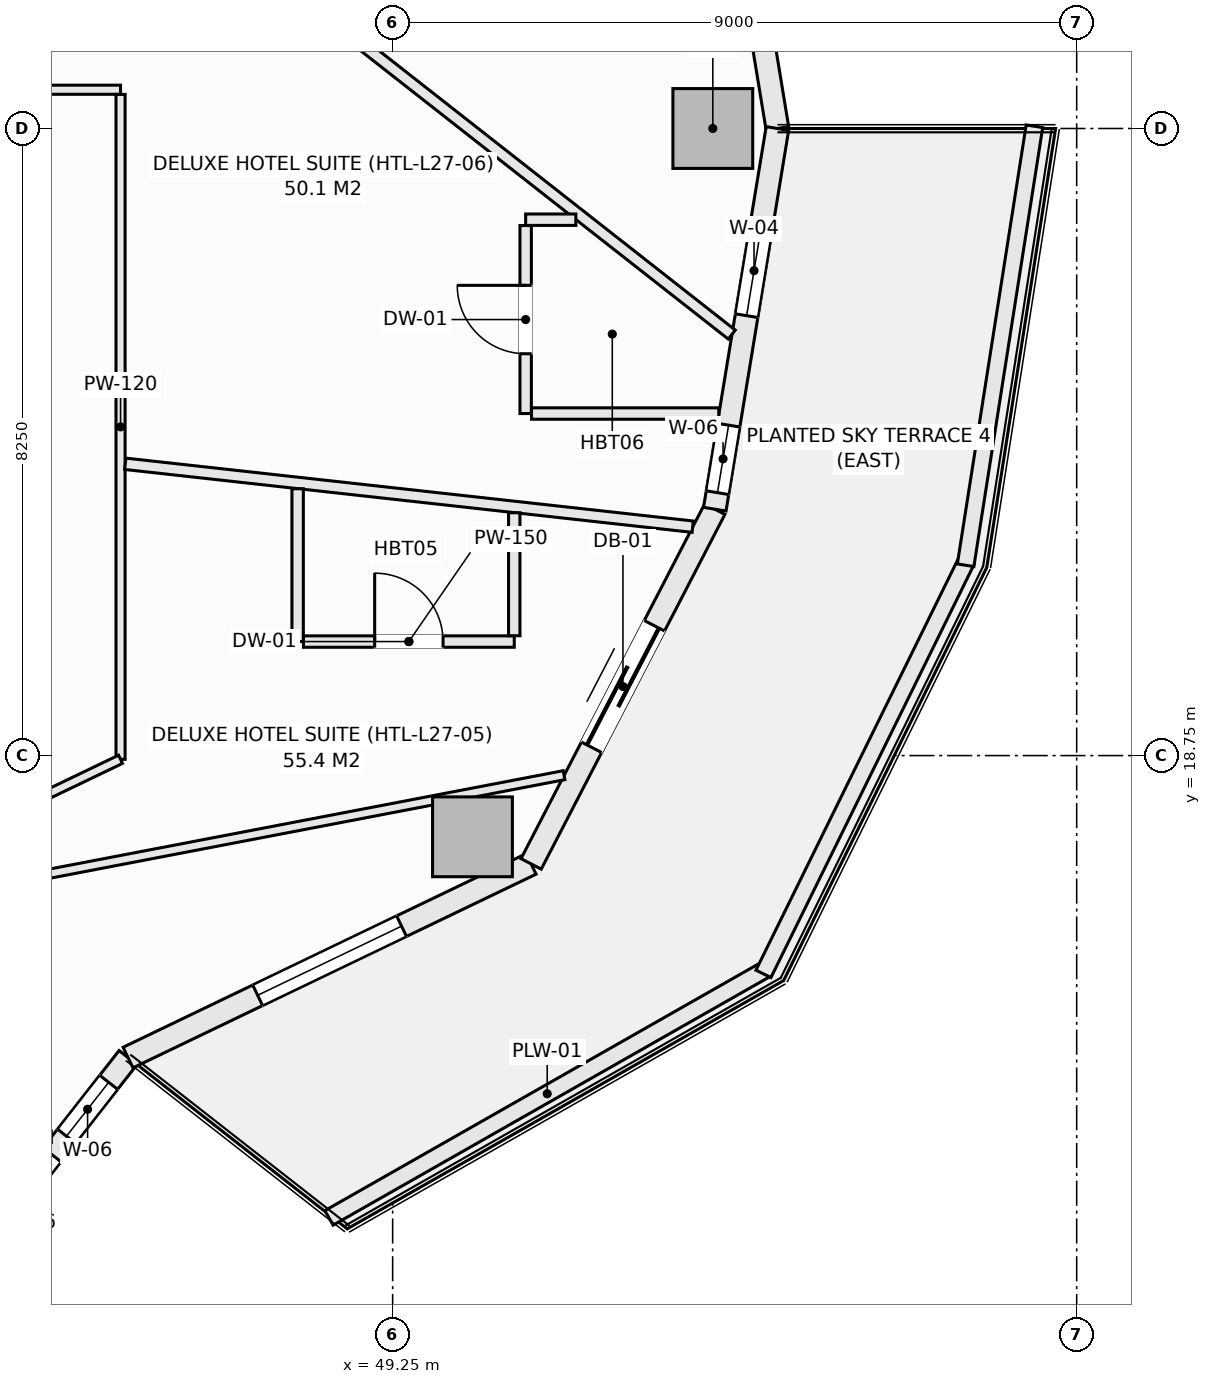
"""IFC4 building model, lengths in metres.
Left out: names, types, materials, properties, quantities, classifications, styles, units other than length and angle.
Written with IfcOpenShell. Run it as: python <this file> out.ifc"""

import sys

from ifc_helpers import new_model, si_unit, direction, frame, frame_2d, origin, origin_2d, place, context, subcontext, project, spatial, rectangle, extrude, element, fill, save


model = new_model("IFC4")
c1 = context("Model", 3, precision=1e-05, world=origin(), true_north=direction((0.0, 1.0)))
c2 = subcontext(c1, "Body", "Model", "MODEL_VIEW")
j1 = project(units=[si_unit("LENGTHUNIT", "METRE"), si_unit("PLANEANGLEUNIT", "RADIAN")], contexts=[c1])
p1 = place(None, origin())
s1 = spatial("IfcSite", under=j1, at=p1, CompositionType="ELEMENT")
p2 = place(p1, origin())
s2 = spatial("IfcBuilding", under=s1, at=p2, CompositionType="ELEMENT")
p3 = place(p2, frame((0.0, 0.0, 112.1)))
s3 = spatial("IfcBuildingStorey", under=s2, at=p3, CompositionType="ELEMENT", Elevation=112.1)
for number, where, z_axis, x_axis in (
    (1, (53.462, 27.0, -0.27), (0.0, 0.0, 1.0), (1.0, 0.0, 0.0)),
    (2, (50.3, 17.681, -0.27), (0.0, 0.0, 1.0), (1.0, 0.0, 0.0)),
):
    element("IfcColumn", number, at=place(p3, frame(where, z_axis=z_axis, x_axis=x_axis)), inside=s3, PredefinedType="COLUMN", context=c2, shape_type="SweptSolid", body=[
        extrude(rectangle(XDim=1.05, YDim=1.05, at=origin_2d()), origin(), (0.0, 0.0, 1.0), 3.4),
    ])
p4 = place(p3, frame((53.488, 32.008, 0.0), z_axis=(0.0, 0.0, 1.0), x_axis=(0.162393944769, -0.986726003864, 0.0)))
e3 = element("IfcWall", 3, at=p4, inside=s3, PredefinedType="SOLIDWALL", context=c2, shape_type="SweptSolid", body=[
    extrude(rectangle(XDim=5.075, YDim=0.3, at=frame_2d((2.538, 0.0))), origin(), (0.0, 0.0, 1.0), 2.653),
])
p5 = place(p4, frame((1.488, 0.0, 0.74)))
e4 = element("IfcOpeningElement", 4, at=p5, cuts=e3, PredefinedType="OPENING", context=c2, shape_type="SweptSolid", body=[
    extrude(rectangle(XDim=2.1, YDim=1.7, at=frame_2d((1.05, 0.85))), frame((0.0, 0.16, 0.0), z_axis=(0.0, -1.0, 0.0), x_axis=(1.0, 0.0, 0.0)), (0.0, 0.0, 1.0), 0.32),
])
p6 = place(p3, frame((42.219, 10.242, 0.0), z_axis=(0.0, 0.0, 1.0), x_axis=(0.616435134162, 0.787405693001, 0.0)))
e5 = element("IfcWall", 5, at=p6, inside=s3, PredefinedType="SOLIDWALL", context=c2, shape_type="SweptSolid", body=[
    extrude(rectangle(XDim=5.759, YDim=0.3, at=frame_2d((2.879, 0.0))), origin(), (0.0, 0.0, 1.0), 2.653),
])
p7 = place(p6, frame((3.236, 0.0, 0.74)))
e6 = element("IfcOpeningElement", 6, at=p7, cuts=e5, PredefinedType="OPENING", context=c2, shape_type="SweptSolid", body=[
    extrude(rectangle(XDim=0.9, YDim=1.7, at=frame_2d((0.45, 0.85))), frame((0.0, 0.16, 0.0), z_axis=(0.0, -1.0, 0.0), x_axis=(1.0, 0.0, 0.0)), (0.0, 0.0, 1.0), 0.32),
])
p8 = place(p6, frame((4.445, 0.0, 0.74)))
e7 = element("IfcOpeningElement", 7, at=p8, cuts=e5, PredefinedType="OPENING", context=c2, shape_type="SweptSolid", body=[
    extrude(rectangle(XDim=0.9, YDim=1.7, at=frame_2d((0.45, 0.85))), frame((0.0, 0.16, 0.0), z_axis=(0.0, -1.0, 0.0), x_axis=(1.0, 0.0, 0.0)), (0.0, 0.0, 1.0), 0.32),
])
p9 = place(p3, frame((45.769, 14.777, 0.0), z_axis=(0.0, 0.0, 1.0), x_axis=(0.901370184739, 0.433049408339, 0.0)))
e8 = element("IfcWall", 8, at=p9, inside=s3, PredefinedType="SOLIDWALL", context=c2, shape_type="SweptSolid", body=[
    extrude(rectangle(XDim=5.884, YDim=0.3, at=frame_2d((2.942, 0.0))), origin(), (0.0, 0.0, 1.0), 2.653),
])
p10 = place(p9, frame((1.892, 0.0, 0.74)))
e9 = element("IfcOpeningElement", 9, at=p10, cuts=e8, PredefinedType="OPENING", context=c2, shape_type="SweptSolid", body=[
    extrude(rectangle(XDim=2.1, YDim=1.7, at=frame_2d((1.05, 0.85))), frame((0.0, 0.16, 0.0), z_axis=(0.0, -1.0, 0.0), x_axis=(1.0, 0.0, 0.0)), (0.0, 0.0, 1.0), 0.32),
])
p11 = place(p3, frame((51.072, 17.325, 0.0), z_axis=(0.0, 0.0, 1.0), x_axis=(0.459767899643, 0.888039119892, 0.0)))
e10 = element("IfcWall", 10, at=p11, inside=s3, PredefinedType="SOLIDWALL", context=c2, shape_type="SweptSolid", body=[
    extrude(rectangle(XDim=5.255, YDim=0.3, at=frame_2d((2.628, 0.0))), origin(), (0.0, 0.0, 1.0), 2.653),
])
p12 = place(p11, frame((1.728, 0.0, 0.0)))
e11 = element("IfcOpeningElement", 11, at=p12, cuts=e10, PredefinedType="OPENING", context=c2, shape_type="SweptSolid", body=[
    extrude(rectangle(XDim=1.8, YDim=2.25, at=frame_2d((0.9, 1.125))), frame((0.0, 0.16, 0.0), z_axis=(0.0, -1.0, 0.0), x_axis=(1.0, 0.0, 0.0)), (0.0, 0.0, 1.0), 0.32),
])
p13 = place(p3, frame((53.488, 21.992, 0.0), z_axis=(0.0, 0.0, 1.0), x_axis=(0.162393944769, 0.986726003864, 0.0)))
e12 = element("IfcWall", 12, at=p13, inside=s3, PredefinedType="SOLIDWALL", context=c2, shape_type="SweptSolid", body=[
    extrude(rectangle(XDim=5.075, YDim=0.3, at=frame_2d((2.538, 0.0))), origin(), (0.0, 0.0, 1.0), 2.653),
])
p14 = place(p13, frame((2.58, 0.0, 0.72)))
e13 = element("IfcOpeningElement", 13, at=p14, cuts=e12, PredefinedType="OPENING", context=c2, shape_type="SweptSolid", body=[
    extrude(rectangle(XDim=1.2, YDim=1.65, at=frame_2d((0.6, 0.825))), frame((0.0, 0.16, 0.0), z_axis=(0.0, -1.0, 0.0), x_axis=(1.0, 0.0, 0.0)), (0.0, 0.0, 1.0), 0.32),
])
p15 = place(p13, frame((0.22, 0.0, 0.72)))
e14 = element("IfcOpeningElement", 14, at=p15, cuts=e12, PredefinedType="OPENING", context=c2, shape_type="SweptSolid", body=[
    extrude(rectangle(XDim=0.9, YDim=1.65, at=frame_2d((0.45, 0.825))), frame((0.0, 0.16, 0.0), z_axis=(0.0, -1.0, 0.0), x_axis=(1.0, 0.0, 0.0)), (0.0, 0.0, 1.0), 0.32),
])
p16 = place(p3, frame((48.413, 12.668, 0.0), z_axis=(0.0, 0.0, 1.0), x_axis=(0.869187658335, 0.494482370361, 0.0)))
e15 = element("IfcWall", 15, at=p16, inside=s3, PredefinedType="PARAPET", context=c2, shape_type="SweptSolid", body=[
    extrude(rectangle(XDim=6.606, YDim=0.22, at=frame_2d((3.303, 0.0))), origin(), (0.0, 0.0, 1.0), 0.52),
])
p17 = place(p3, frame((54.129, 15.878, 0.0), z_axis=(0.0, 0.0, 1.0), x_axis=(0.441269631716, 0.897374566235, 0.0)))
e16 = element("IfcWall", 16, at=p17, inside=s3, PredefinedType="PARAPET", context=c2, shape_type="SweptSolid", body=[
    extrude(rectangle(XDim=6.056, YDim=0.22, at=frame_2d((3.028, 0.0))), origin(), (0.0, 0.0, 1.0), 0.52),
])
p18 = place(p3, frame((56.789, 21.254, 0.0), z_axis=(0.0, 0.0, 1.0), x_axis=(0.154903030247, 0.987929679289, 0.0)))
e17 = element("IfcWall", 17, at=p18, inside=s3, PredefinedType="PARAPET", context=c2, shape_type="SweptSolid", body=[
    extrude(rectangle(XDim=5.846, YDim=0.22, at=frame_2d((2.923, 0.0))), origin(), (0.0, 0.0, 1.0), 0.52),
])
p19 = place(p3, frame((43.812, 27.51, 0.0), z_axis=(0.0, 0.0, 1.0), x_axis=(1.0, 0.0, 0.0)))
e18 = element("IfcWall", 18, at=p19, inside=s3, PredefinedType="PARTITIONING", context=c2, shape_type="SweptSolid", body=[
    extrude(rectangle(XDim=1.858, YDim=0.12, at=frame_2d((0.929, 0.0))), origin(), (0.0, 0.0, 1.0), 3.13),
])
p20 = place(p3, frame((45.67, 18.701, 0.0), z_axis=(0.0, 0.0, 1.0), x_axis=(0.0, 1.0, 0.0)))
e19 = element("IfcWall", 19, at=p20, inside=s3, PredefinedType="PARTITIONING", context=c2, shape_type="SweptSolid", body=[
    extrude(rectangle(XDim=8.747, YDim=0.12, at=frame_2d((4.374, 0.0))), origin(), (0.0, 0.0, 1.0), 3.13),
])
p21 = place(p3, frame((43.812, 17.809, 0.0), z_axis=(0.0, 0.0, 1.0), x_axis=(0.901467594949, 0.432846595525, 0.0)))
e20 = element("IfcWall", 20, at=p21, inside=s3, PredefinedType="PARTITIONING", context=c2, shape_type="SweptSolid", body=[
    extrude(rectangle(XDim=2.061, YDim=0.12, at=frame_2d((1.031, 0.0))), origin(), (0.0, 0.0, 1.0), 3.13),
])
p22 = place(p3, frame((45.732, 22.589, 0.0), z_axis=(0.0, 0.0, 1.0), x_axis=(0.993915007742, -0.110149704422, 0.0)))
e21 = element("IfcWall", 21, at=p22, inside=s3, PredefinedType="PARTITIONING", context=c2, shape_type="SweptSolid", body=[
    extrude(rectangle(XDim=7.511, YDim=0.15, at=frame_2d((3.756, 0.0))), origin(), (0.0, 0.0, 1.0), 3.13),
])
p23 = place(p3, frame((39.082, 16.114, 0.0), z_axis=(0.0, 0.0, 1.0), x_axis=(0.982162094293, 0.188036221334, 0.0)))
e22 = element("IfcWall", 22, at=p23, inside=s3, PredefinedType="PARTITIONING", context=c2, shape_type="SweptSolid", body=[
    extrude(rectangle(XDim=12.649, YDim=0.12, at=frame_2d((6.324, 0.0))), origin(), (0.0, 0.0, 1.0), 2.812),
])
p24 = place(p3, frame((48.0, 20.25, 0.0), z_axis=(0.0, 0.0, 1.0), x_axis=(0.0, 1.0, 0.0)))
e23 = element("IfcWall", 23, at=p24, inside=s3, PredefinedType="PARTITIONING", context=c2, shape_type="SweptSolid", body=[
    extrude(rectangle(XDim=2.01, YDim=0.15, at=frame_2d((1.005, 0.0))), origin(), (0.0, 0.0, 1.0), 3.13),
])
p25 = place(p3, frame((48.077, 20.25, 0.0), z_axis=(0.0, 0.0, 1.0), x_axis=(1.0, 0.0, 0.0)))
e24 = element("IfcWall", 24, at=p25, inside=s3, PredefinedType="PARTITIONING", context=c2, shape_type="SweptSolid", body=[
    extrude(rectangle(XDim=2.773, YDim=0.15, at=frame_2d((1.387, 0.0))), origin(), (0.0, 0.0, 1.0), 3.13),
])
p26 = place(p25, frame((0.937, 0.0, 0.0)))
e25 = element("IfcOpeningElement", 25, at=p26, cuts=e24, PredefinedType="OPENING", context=c2, shape_type="SweptSolid", body=[
    extrude(rectangle(XDim=0.9, YDim=2.1, at=frame_2d((0.45, 1.05))), frame((0.0, 0.085, 0.0), z_axis=(0.0, -1.0, 0.0), x_axis=(1.0, 0.0, 0.0)), (0.0, 0.0, 1.0), 0.17),
])
p27 = place(p3, frame((50.85, 20.327, 0.0), z_axis=(0.0, 0.0, 1.0), x_axis=(0.0, 1.0, 0.0)))
e26 = element("IfcWall", 26, at=p27, inside=s3, PredefinedType="PARTITIONING", context=c2, shape_type="SweptSolid", body=[
    extrude(rectangle(XDim=1.617, YDim=0.15, at=frame_2d((0.809, 0.0))), origin(), (0.0, 0.0, 1.0), 3.13),
])
p28 = place(p3, frame((45.258, 30.919, 0.0), z_axis=(0.0, 0.0, 1.0), x_axis=(0.786869212034, -0.617119796436, 0.0)))
e27 = element("IfcWall", 27, at=p28, inside=s3, PredefinedType="PARTITIONING", context=c2, shape_type="SweptSolid", body=[
    extrude(rectangle(XDim=10.744, YDim=0.15, at=frame_2d((5.372, 0.0))), origin(), (0.0, 0.0, 1.0), 2.505),
])
p29 = place(p3, frame((51.0, 25.8, 0.0), z_axis=(0.0, 0.0, 1.0), x_axis=(1.0, 0.0, 0.0)))
e28 = element("IfcWall", 28, at=p29, inside=s3, PredefinedType="PARTITIONING", context=c2, shape_type="SweptSolid", body=[
    extrude(rectangle(XDim=0.66, YDim=0.15, at=frame_2d((0.33, 0.0))), origin(), (0.0, 0.0, 1.0), 3.13),
])
p30 = place(p3, frame((51.0, 23.25, 0.0), z_axis=(0.0, 0.0, 1.0), x_axis=(0.0, 1.0, 0.0)))
e29 = element("IfcWall", 29, at=p30, inside=s3, PredefinedType="PARTITIONING", context=c2, shape_type="SweptSolid", body=[
    extrude(rectangle(XDim=2.473, YDim=0.15, at=frame_2d((1.236, 0.0))), origin(), (0.0, 0.0, 1.0), 3.13),
])
p31 = place(p30, frame((0.787, 0.0, 0.0)))
e30 = element("IfcOpeningElement", 30, at=p31, cuts=e29, PredefinedType="OPENING", context=c2, shape_type="SweptSolid", body=[
    extrude(rectangle(XDim=0.9, YDim=2.1, at=frame_2d((0.45, 1.05))), frame((0.0, 0.085, 0.0), z_axis=(0.0, -1.0, 0.0), x_axis=(1.0, 0.0, 0.0)), (0.0, 0.0, 1.0), 0.17),
])
p32 = place(p3, frame((51.077, 23.25, 0.0), z_axis=(0.0, 0.0, 1.0), x_axis=(1.0, 0.0, 0.0)))
e31 = element("IfcWall", 31, at=p32, inside=s3, PredefinedType="PARTITIONING", context=c2, shape_type="SweptSolid", body=[
    extrude(rectangle(XDim=2.464, YDim=0.15, at=frame_2d((1.232, 0.0))), origin(), (0.0, 0.0, 1.0), 3.13),
])
p33 = place(p7, origin())
e32 = element("IfcWindow", 32, at=p33, inside=s3, PartitioningType="SINGLE_PANEL", PredefinedType="WINDOW", context=c2, shape_type="SweptSolid", body=[
    extrude(rectangle(XDim=0.9, YDim=1.7, at=frame_2d((0.45, 0.85))), frame((0.0, 0.03, 0.0), z_axis=(0.0, -1.0, 0.0), x_axis=(1.0, 0.0, 0.0)), (0.0, 0.0, 1.0), 0.06),
])
fill(e6, e32)
p34 = place(p10, origin())
e33 = element("IfcWindow", 33, at=p34, inside=s3, PartitioningType="SINGLE_PANEL", PredefinedType="WINDOW", context=c2, shape_type="SweptSolid", body=[
    extrude(rectangle(XDim=2.1, YDim=1.7, at=frame_2d((1.05, 0.85))), frame((0.0, 0.03, 0.0), z_axis=(0.0, -1.0, 0.0), x_axis=(1.0, 0.0, 0.0)), (0.0, 0.0, 1.0), 0.06),
])
fill(e9, e33)
p35 = place(p12, frame((1.8, 0.0, 0.0), z_axis=(0.0, 0.0, 1.0), x_axis=(-1.0, 0.0, 0.0)))
e34 = element("IfcDoor", 34, at=p35, inside=s3, OperationType="SLIDING_TO_LEFT", PredefinedType="DOOR", context=c2, shape_type="SweptSolid", body=[
    extrude(rectangle(XDim=1.8, YDim=2.25, at=frame_2d((0.9, 1.125))), frame((0.0, 0.025, 0.0), z_axis=(0.0, -1.0, 0.0), x_axis=(1.0, 0.0, 0.0)), (0.0, 0.0, 1.0), 0.05),
])
fill(e11, e34)
p36 = place(p14, origin())
e35 = element("IfcWindow", 35, at=p36, inside=s3, PartitioningType="SINGLE_PANEL", PredefinedType="WINDOW", context=c2, shape_type="SweptSolid", body=[
    extrude(rectangle(XDim=1.2, YDim=1.65, at=frame_2d((0.6, 0.825))), frame((0.0, 0.03, 0.0), z_axis=(0.0, -1.0, 0.0), x_axis=(1.0, 0.0, 0.0)), (0.0, 0.0, 1.0), 0.06),
])
fill(e13, e35)
p37 = place(p26, origin())
e36 = element("IfcDoor", 36, at=p37, inside=s3, OperationType="SINGLE_SWING_LEFT", PredefinedType="DOOR", context=c2, shape_type="SweptSolid", body=[
    extrude(rectangle(XDim=0.9, YDim=2.1, at=frame_2d((0.45, 1.05))), frame((0.0, 0.025, 0.0), z_axis=(0.0, -1.0, 0.0), x_axis=(1.0, 0.0, 0.0)), (0.0, 0.0, 1.0), 0.05),
])
fill(e25, e36)
p38 = place(p31, origin())
e37 = element("IfcDoor", 37, at=p38, inside=s3, OperationType="SINGLE_SWING_RIGHT", PredefinedType="DOOR", context=c2, shape_type="SweptSolid", body=[
    extrude(rectangle(XDim=0.9, YDim=2.1, at=frame_2d((0.45, 1.05))), frame((0.0, 0.025, 0.0), z_axis=(0.0, -1.0, 0.0), x_axis=(1.0, 0.0, 0.0)), (0.0, 0.0, 1.0), 0.05),
])
fill(e30, e37)
p39 = place(p8, origin())
e38 = element("IfcWindow", 38, at=p39, inside=s3, PartitioningType="SINGLE_PANEL", PredefinedType="WINDOW", context=c2, shape_type="SweptSolid", body=[
    extrude(rectangle(XDim=0.9, YDim=1.7, at=frame_2d((0.45, 0.85))), frame((0.0, 0.03, 0.0), z_axis=(0.0, -1.0, 0.0), x_axis=(1.0, 0.0, 0.0)), (0.0, 0.0, 1.0), 0.06),
])
fill(e7, e38)
p40 = place(p15, origin())
e39 = element("IfcWindow", 39, at=p40, inside=s3, PartitioningType="SINGLE_PANEL", PredefinedType="WINDOW", context=c2, shape_type="SweptSolid", body=[
    extrude(rectangle(XDim=0.9, YDim=1.65, at=frame_2d((0.45, 0.825))), frame((0.0, 0.03, 0.0), z_axis=(0.0, -1.0, 0.0), x_axis=(1.0, 0.0, 0.0)), (0.0, 0.0, 1.0), 0.06),
])
fill(e14, e39)
save(model, sys.argv[1])
